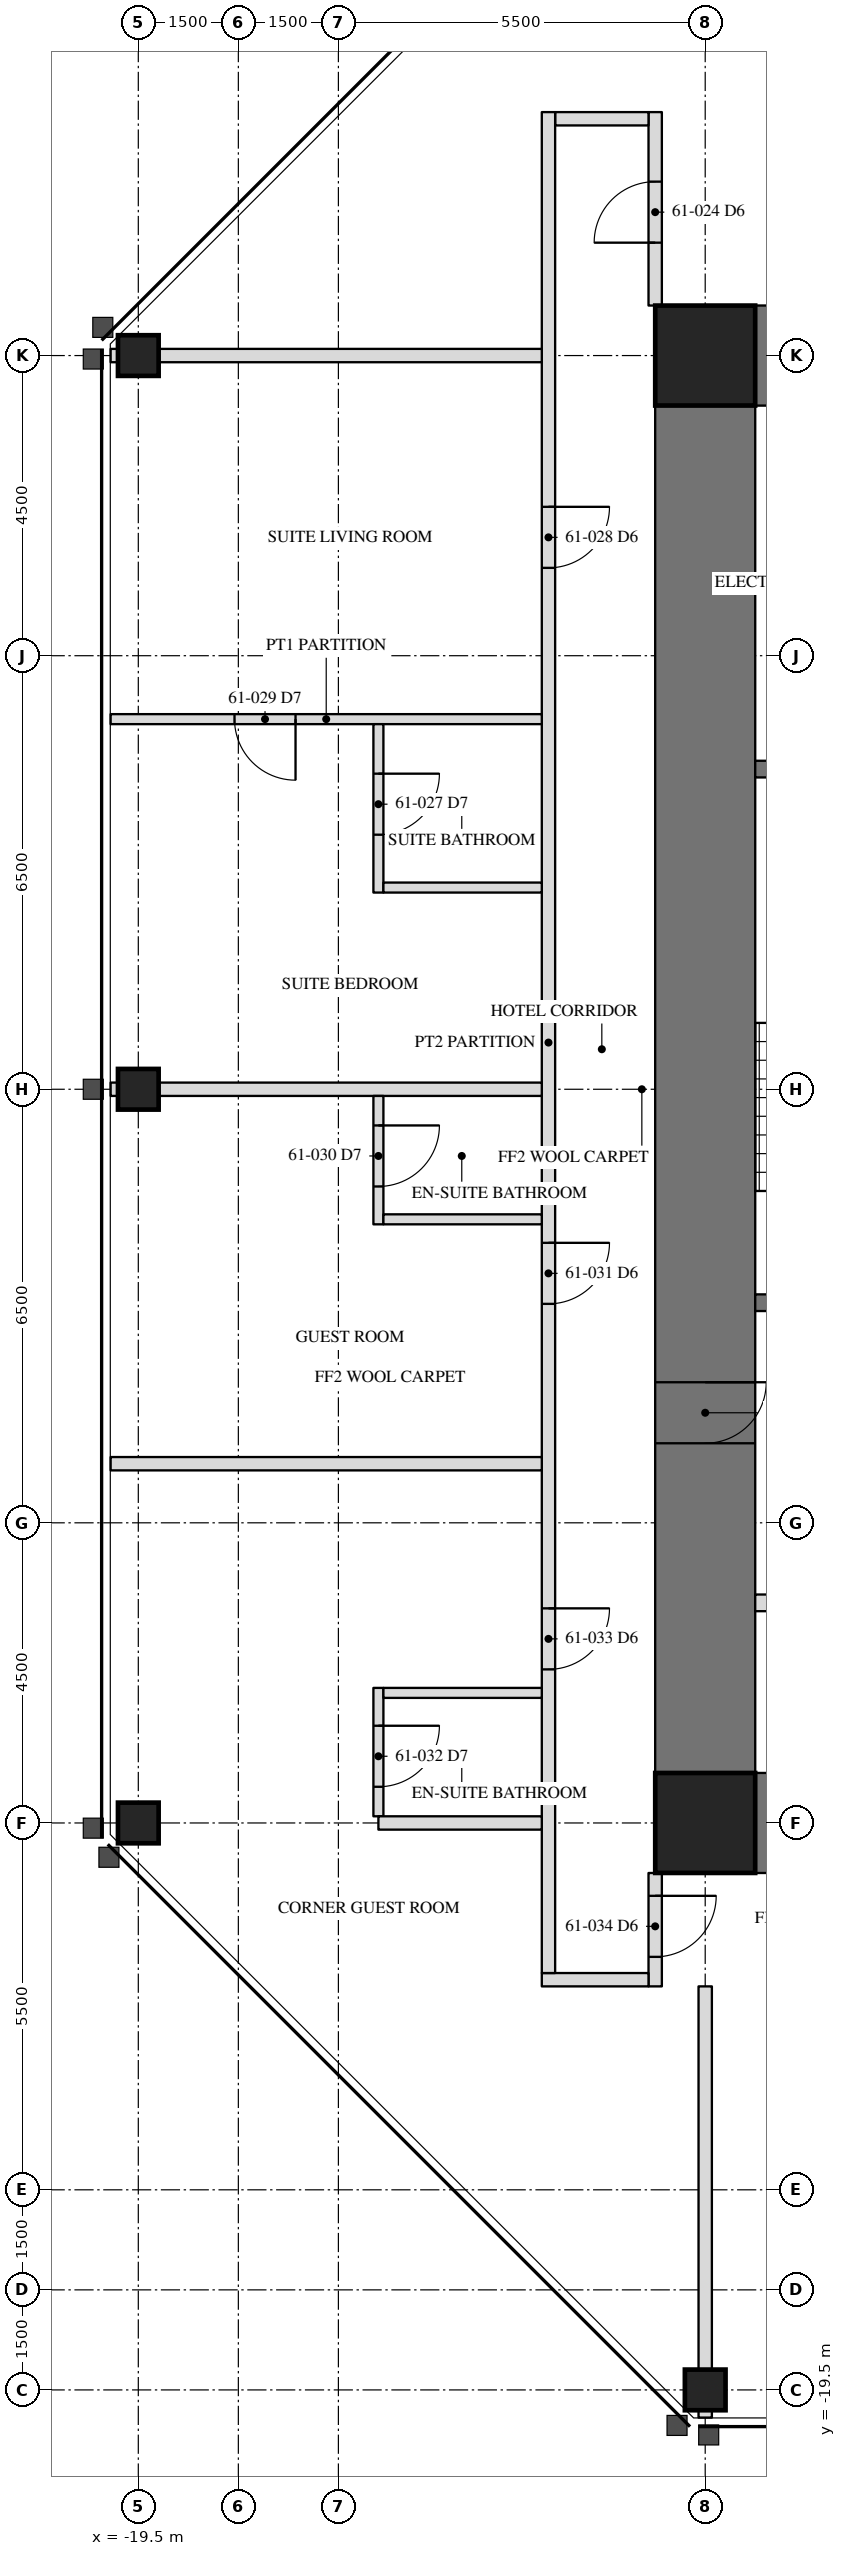
"""IFC4 building model, lengths in metres.
Left out: names, types, materials, properties, quantities, classifications, styles, units other than length and angle.
Written with IfcOpenShell. Run it as: python <this file> out.ifc"""

import sys

from ifc_helpers import new_model, si_unit, direction, frame, frame_2d, origin, origin_2d, place, context, subcontext, project, spatial, rectangle, hollow_rectangle, extrude, element, fill, save


model = new_model("IFC4")
c1 = context("Model", 3, precision=1e-05, world=origin(), true_north=direction((0.0, 1.0)))
c2 = subcontext(c1, "Body", "Model", "MODEL_VIEW")
j1 = project(units=[si_unit("LENGTHUNIT", "METRE"), si_unit("PLANEANGLEUNIT", "RADIAN")], contexts=[c1])
p1 = place(None, origin())
s1 = spatial("IfcSite", under=j1, at=p1, CompositionType="ELEMENT")
p2 = place(p1, origin())
s2 = spatial("IfcBuilding", under=s1, at=p2, CompositionType="ELEMENT")
p3 = place(p2, frame((0.0, 0.0, 250.2)))
s3 = spatial("IfcBuildingStorey", under=s2, at=p3, CompositionType="ELEMENT", Elevation=250.2)
for number, where, z_axis, x_axis in (
    (1, (-19.5, 0.0, 0.0), (0.0, 0.0, 1.0), (0.0, 1.0, 0.0)),
    (2, (-19.5, -11.0, 0.0), (0.0, 0.0, 1.0), (0.0, 1.0, 0.0)),
    (3, (-11.0, -19.5, 0.0), (0.0, 0.0, 1.0), (1.0, 0.0, 0.0)),
    (4, (-19.5, 11.0, 0.0), (0.0, 0.0, 1.0), (0.0, 1.0, 0.0)),
):
    element("IfcColumn", number, at=place(p3, frame(where, z_axis=z_axis, x_axis=x_axis)), inside=s3, PredefinedType="COLUMN", context=c2, shape_type="SweptSolid", body=[
        extrude(hollow_rectangle(XDim=0.61, YDim=0.61, WallThickness=0.051, at=origin_2d()), origin(), (0.0, 0.0, 1.0), 3.5),
    ])
p4 = place(p3, frame((-11.0, 11.0, 0.0), z_axis=(0.0, 0.0, 1.0), x_axis=(0.0, -1.0, 0.0)))
e5 = element("IfcWall", 5, at=p4, inside=s3, PredefinedType="SHEAR", context=c2, shape_type="SweptSolid", body=[
    extrude(rectangle(XDim=22.0, YDim=1.5, at=frame_2d((11.0, 0.0))), origin(), (0.0, 0.0, 1.0), 3.5),
])
p5 = place(p4, frame((15.393, 0.0, 0.0)))
e6 = element("IfcOpeningElement", 6, at=p5, cuts=e5, PredefinedType="OPENING", context=c2, shape_type="SweptSolid", body=[
    extrude(rectangle(XDim=0.915, YDim=2.134, at=frame_2d((0.458, 1.067))), frame((0.0, 0.76, 0.0), z_axis=(0.0, -1.0, 0.0), x_axis=(1.0, 0.0, 0.0)), (0.0, 0.0, 1.0), 1.52),
])
for number, where, z_axis, x_axis in (
    (7, (-6.5, 11.0, 0.0), (0.0, 0.0, 1.0), (-1.0, 0.0, 0.0)),
    (8, (-11.0, -11.0, 0.0), (0.0, 0.0, 1.0), (1.0, 0.0, 0.0)),
):
    element("IfcWall", number, at=place(p3, frame(where, z_axis=z_axis, x_axis=x_axis)), inside=s3, PredefinedType="SHEAR", context=c2, shape_type="SweptSolid", body=[
        extrude(rectangle(XDim=4.5, YDim=1.5, at=frame_2d((2.25, 0.0))), origin(), (0.0, 0.0, 1.0), 3.5),
    ])
for number, where, z_axis, x_axis in (
    (9, (-11.0, 11.0, 0.0), (0.0, 0.0, 1.0), (1.0, 0.0, 0.0)),
    (10, (-11.0, -11.0, 0.0), (0.0, 0.0, 1.0), (1.0, 0.0, 0.0)),
):
    element("IfcColumn", number, at=place(p3, frame(where, z_axis=z_axis, x_axis=x_axis)), inside=s3, PredefinedType="COLUMN", context=c2, shape_type="SweptSolid", body=[
        extrude(hollow_rectangle(XDim=1.499, YDim=1.499, WallThickness=0.102, at=origin_2d()), origin(), (0.0, 0.0, 1.0), 3.5),
    ])
p6 = place(p3, frame((-6.95, 4.8, 0.0), z_axis=(0.0, 0.0, 1.0), x_axis=(-1.0, 0.0, 0.0)))
e11 = element("IfcWall", 11, at=p6, inside=s3, PredefinedType="SOLIDWALL", context=c2, shape_type="SweptSolid", body=[
    extrude(rectangle(XDim=3.3, YDim=0.25, at=frame_2d((1.65, 0.0))), origin(), (0.0, 0.0, 1.0), 3.31),
])
p7 = place(p3, frame((-6.95, -3.2, 0.0), z_axis=(0.0, 0.0, 1.0), x_axis=(-1.0, 0.0, 0.0)))
e12 = element("IfcWall", 12, at=p7, inside=s3, PredefinedType="SOLIDWALL", context=c2, shape_type="SweptSolid", body=[
    extrude(rectangle(XDim=3.3, YDim=0.25, at=frame_2d((1.65, 0.0))), origin(), (0.0, 0.0, 1.0), 3.31),
])
p8 = place(p7, frame((1.116, 0.0, 0.0)))
e13 = element("IfcOpeningElement", 13, at=p8, cuts=e12, PredefinedType="OPENING", context=c2, shape_type="SweptSolid", body=[
    extrude(rectangle(XDim=1.067, YDim=2.134, at=frame_2d((0.533, 1.067))), frame((0.0, 0.135, 0.0), z_axis=(0.0, -1.0, 0.0), x_axis=(1.0, 0.0, 0.0)), (0.0, 0.0, 1.0), 0.27),
])
p9 = place(p3, frame((-6.95, -7.7, 0.0), z_axis=(0.0, 0.0, 1.0), x_axis=(-1.0, 0.0, 0.0)))
e14 = element("IfcWall", 14, at=p9, inside=s3, PredefinedType="PARTITIONING", context=c2, shape_type="SweptSolid", body=[
    extrude(rectangle(XDim=3.3, YDim=0.25, at=frame_2d((1.65, 0.0))), origin(), (0.0, 0.0, 1.0), 3.31),
])
p10 = place(p9, frame((0.45, 0.0, 0.0)))
e15 = element("IfcOpeningElement", 15, at=p10, cuts=e14, PredefinedType="OPENING", context=c2, shape_type="SweptSolid", body=[
    extrude(rectangle(XDim=1.219, YDim=2.134, at=frame_2d((0.609, 1.067))), frame((0.0, 0.135, 0.0), z_axis=(0.0, -1.0, 0.0), x_axis=(1.0, 0.0, 0.0)), (0.0, 0.0, 1.0), 0.27),
])
p11 = place(p3, frame((-11.75, 11.75, 0.0), z_axis=(0.0, 0.0, 1.0), x_axis=(0.0, 1.0, 0.0)))
e16 = element("IfcWall", 16, at=p11, inside=s3, PredefinedType="PARTITIONING", context=c2, shape_type="SweptSolid", body=[
    extrude(rectangle(XDim=2.9, YDim=0.2, at=frame_2d((1.45, 0.0))), origin(), (0.0, 0.0, 1.0), 3.31),
])
p12 = place(p11, frame((0.942, 0.0, 0.0)))
e17 = element("IfcOpeningElement", 17, at=p12, cuts=e16, PredefinedType="OPENING", context=c2, shape_type="SweptSolid", body=[
    extrude(rectangle(XDim=0.915, YDim=2.134, at=frame_2d((0.458, 1.067))), frame((0.0, 0.11, 0.0), z_axis=(0.0, -1.0, 0.0), x_axis=(1.0, 0.0, 0.0)), (0.0, 0.0, 1.0), 0.22),
])
p13 = place(p3, frame((-11.85, 14.55, 0.0), z_axis=(0.0, 0.0, 1.0), x_axis=(-1.0, 0.0, 0.0)))
e18 = element("IfcWall", 18, at=p13, inside=s3, PredefinedType="PARTITIONING", context=c2, shape_type="SweptSolid", body=[
    extrude(rectangle(XDim=1.4, YDim=0.2, at=frame_2d((0.7, 0.0))), origin(), (0.0, 0.0, 1.0), 3.31),
])
p14 = place(p3, frame((-11.75, -11.75, 0.0), z_axis=(0.0, 0.0, 1.0), x_axis=(0.0, -1.0, 0.0)))
e19 = element("IfcWall", 19, at=p14, inside=s3, PredefinedType="PARTITIONING", context=c2, shape_type="SweptSolid", body=[
    extrude(rectangle(XDim=1.7, YDim=0.2, at=frame_2d((0.85, 0.0))), origin(), (0.0, 0.0, 1.0), 3.31),
])
p15 = place(p14, frame((0.343, 0.0, 0.0)))
e20 = element("IfcOpeningElement", 20, at=p15, cuts=e19, PredefinedType="OPENING", context=c2, shape_type="SweptSolid", body=[
    extrude(rectangle(XDim=0.915, YDim=2.134, at=frame_2d((0.458, 1.067))), frame((0.0, 0.11, 0.0), z_axis=(0.0, -1.0, 0.0), x_axis=(1.0, 0.0, 0.0)), (0.0, 0.0, 1.0), 0.22),
])
p16 = place(p3, frame((-13.45, -13.35, 0.0), z_axis=(0.0, 0.0, 1.0), x_axis=(1.0, 0.0, 0.0)))
e21 = element("IfcWall", 21, at=p16, inside=s3, PredefinedType="PARTITIONING", context=c2, shape_type="SweptSolid", body=[
    extrude(rectangle(XDim=1.6, YDim=0.2, at=frame_2d((0.8, 0.0))), origin(), (0.0, 0.0, 1.0), 3.31),
])
p17 = place(p3, frame((-13.35, 14.65, 0.0), z_axis=(0.0, 0.0, 1.0), x_axis=(0.0, -1.0, 0.0)))
e22 = element("IfcWall", 22, at=p17, inside=s3, PredefinedType="PARTITIONING", context=c2, shape_type="SweptSolid", body=[
    extrude(rectangle(XDim=27.9, YDim=0.2, at=frame_2d((13.95, 0.0))), origin(), (0.0, 0.0, 1.0), 3.31),
])
p18 = place(p17, frame((5.918, 0.0, 0.0)))
e23 = element("IfcOpeningElement", 23, at=p18, cuts=e22, PredefinedType="OPENING", context=c2, shape_type="SweptSolid", body=[
    extrude(rectangle(XDim=0.915, YDim=2.134, at=frame_2d((0.458, 1.067))), frame((0.0, 0.11, 0.0), z_axis=(0.0, -1.0, 0.0), x_axis=(1.0, 0.0, 0.0)), (0.0, 0.0, 1.0), 0.22),
])
p19 = place(p17, frame((16.952, 0.0, 0.0)))
e24 = element("IfcOpeningElement", 24, at=p19, cuts=e22, PredefinedType="OPENING", context=c2, shape_type="SweptSolid", body=[
    extrude(rectangle(XDim=0.915, YDim=2.134, at=frame_2d((0.458, 1.067))), frame((0.0, 0.11, 0.0), z_axis=(0.0, -1.0, 0.0), x_axis=(1.0, 0.0, 0.0)), (0.0, 0.0, 1.0), 0.22),
])
p20 = place(p17, frame((22.433, 0.0, 0.0)))
e25 = element("IfcOpeningElement", 25, at=p20, cuts=e22, PredefinedType="OPENING", context=c2, shape_type="SweptSolid", body=[
    extrude(rectangle(XDim=0.915, YDim=2.134, at=frame_2d((0.458, 1.067))), frame((0.0, 0.11, 0.0), z_axis=(0.0, -1.0, 0.0), x_axis=(1.0, 0.0, 0.0)), (0.0, 0.0, 1.0), 0.22),
])
for number, where, z_axis, x_axis in (
    (26, (-13.45, 11.0, 0.0), (0.0, 0.0, 1.0), (-1.0, 0.0, 0.0)),
    (27, (-13.45, 0.0, 0.0), (0.0, 0.0, 1.0), (-1.0, 0.0, 0.0)),
):
    element("IfcWall", number, at=place(p3, frame(where, z_axis=z_axis, x_axis=x_axis)), inside=s3, PredefinedType="PARTITIONING", context=c2, shape_type="SweptSolid", body=[
        extrude(rectangle(XDim=6.465, YDim=0.2, at=frame_2d((3.232, 0.0))), origin(), (0.0, 0.0, 1.0), 2.802),
    ])
p21 = place(p3, frame((-13.45, -5.614, 0.0), z_axis=(0.0, 0.0, 1.0), x_axis=(-1.0, 0.0, 0.0)))
e28 = element("IfcWall", 28, at=p21, inside=s3, PredefinedType="PARTITIONING", context=c2, shape_type="SweptSolid", body=[
    extrude(rectangle(XDim=6.465, YDim=0.2, at=frame_2d((3.232, 0.0))), origin(), (0.0, 0.0, 1.0), 3.31),
])
p22 = place(p3, frame((-13.45, 5.549, 0.0), z_axis=(0.0, 0.0, 1.0), x_axis=(-1.0, 0.0, 0.0)))
e29 = element("IfcWall", 29, at=p22, inside=s3, PredefinedType="PARTITIONING", context=c2, shape_type="SweptSolid", body=[
    extrude(rectangle(XDim=6.465, YDim=0.15, at=frame_2d((3.232, 0.0))), origin(), (0.0, 0.0, 1.0), 3.31),
])
p23 = place(p22, frame((3.692, 0.0, 0.0)))
e30 = element("IfcOpeningElement", 30, at=p23, cuts=e29, PredefinedType="OPENING", context=c2, shape_type="SweptSolid", body=[
    extrude(rectangle(XDim=0.915, YDim=2.032, at=frame_2d((0.458, 1.016))), frame((0.0, 0.085, 0.0), z_axis=(0.0, -1.0, 0.0), x_axis=(1.0, 0.0, 0.0)), (0.0, 0.0, 1.0), 0.17),
])
p24 = place(p3, frame((-15.9, 5.474, 0.0), z_axis=(0.0, 0.0, 1.0), x_axis=(0.0, -1.0, 0.0)))
e31 = element("IfcWall", 31, at=p24, inside=s3, PredefinedType="PARTITIONING", context=c2, shape_type="SweptSolid", body=[
    extrude(rectangle(XDim=2.525, YDim=0.15, at=frame_2d((1.263, 0.0))), origin(), (0.0, 0.0, 1.0), 3.31),
])
p25 = place(p24, frame((0.742, 0.0, 0.0)))
e32 = element("IfcOpeningElement", 32, at=p25, cuts=e31, PredefinedType="OPENING", context=c2, shape_type="SweptSolid", body=[
    extrude(rectangle(XDim=0.915, YDim=2.032, at=frame_2d((0.458, 1.016))), frame((0.0, 0.085, 0.0), z_axis=(0.0, -1.0, 0.0), x_axis=(1.0, 0.0, 0.0)), (0.0, 0.0, 1.0), 0.17),
])
p26 = place(p3, frame((-13.45, 3.024, 0.0), z_axis=(0.0, 0.0, 1.0), x_axis=(-1.0, 0.0, 0.0)))
e33 = element("IfcWall", 33, at=p26, inside=s3, PredefinedType="PARTITIONING", context=c2, shape_type="SweptSolid", body=[
    extrude(rectangle(XDim=2.375, YDim=0.15, at=frame_2d((1.188, 0.0))), origin(), (0.0, 0.0, 1.0), 3.31),
])
p27 = place(p3, frame((-15.9, -0.1, 0.0), z_axis=(0.0, 0.0, 1.0), x_axis=(0.0, -1.0, 0.0)))
e34 = element("IfcWall", 34, at=p27, inside=s3, PredefinedType="PARTITIONING", context=c2, shape_type="SweptSolid", body=[
    extrude(rectangle(XDim=1.925, YDim=0.15, at=frame_2d((0.962, 0.0))), origin(), (0.0, 0.0, 1.0), 3.31),
])
p28 = place(p27, frame((0.442, 0.0, 0.0)))
e35 = element("IfcOpeningElement", 35, at=p28, cuts=e34, PredefinedType="OPENING", context=c2, shape_type="SweptSolid", body=[
    extrude(rectangle(XDim=0.915, YDim=2.032, at=frame_2d((0.458, 1.016))), frame((0.0, 0.085, 0.0), z_axis=(0.0, -1.0, 0.0), x_axis=(1.0, 0.0, 0.0)), (0.0, 0.0, 1.0), 0.17),
])
p29 = place(p3, frame((-13.45, -1.95, 0.0), z_axis=(0.0, 0.0, 1.0), x_axis=(-1.0, 0.0, 0.0)))
e36 = element("IfcWall", 36, at=p29, inside=s3, PredefinedType="PARTITIONING", context=c2, shape_type="SweptSolid", body=[
    extrude(rectangle(XDim=2.375, YDim=0.15, at=frame_2d((1.188, 0.0))), origin(), (0.0, 0.0, 1.0), 3.31),
])
p30 = place(p3, frame((-15.9, -8.975, 0.0), z_axis=(0.0, 0.0, 1.0), x_axis=(0.0, -1.0, 0.0)))
e37 = element("IfcWall", 37, at=p30, inside=s3, PredefinedType="PARTITIONING", context=c2, shape_type="SweptSolid", body=[
    extrude(rectangle(XDim=1.925, YDim=0.15, at=frame_2d((0.962, 0.0))), origin(), (0.0, 0.0, 1.0), 3.31),
])
p31 = place(p30, frame((0.567, 0.0, 0.0)))
e38 = element("IfcOpeningElement", 38, at=p31, cuts=e37, PredefinedType="OPENING", context=c2, shape_type="SweptSolid", body=[
    extrude(rectangle(XDim=0.915, YDim=2.032, at=frame_2d((0.458, 1.016))), frame((0.0, 0.085, 0.0), z_axis=(0.0, -1.0, 0.0), x_axis=(1.0, 0.0, 0.0)), (0.0, 0.0, 1.0), 0.17),
])
p32 = place(p3, frame((-13.45, -9.05, 0.0), z_axis=(0.0, 0.0, 1.0), x_axis=(-1.0, 0.0, 0.0)))
e39 = element("IfcWall", 39, at=p32, inside=s3, PredefinedType="PARTITIONING", context=c2, shape_type="SweptSolid", body=[
    extrude(rectangle(XDim=2.375, YDim=0.15, at=frame_2d((1.188, 0.0))), origin(), (0.0, 0.0, 1.0), 3.31),
])
p33 = place(p3, frame((-13.45, -11.0, 0.0), z_axis=(0.0, 0.0, 1.0), x_axis=(-1.0, 0.0, 0.0)))
e40 = element("IfcWall", 40, at=p33, inside=s3, PredefinedType="PARTITIONING", context=c2, shape_type="SweptSolid", body=[
    extrude(rectangle(XDim=2.45, YDim=0.2, at=frame_2d((1.225, 0.0))), origin(), (0.0, 0.0, 1.0), 2.802),
])
p34 = place(p3, frame((-11.0, -13.45, 0.0), z_axis=(0.0, 0.0, 1.0), x_axis=(0.0, -1.0, 0.0)))
e41 = element("IfcWall", 41, at=p34, inside=s3, PredefinedType="PARTITIONING", context=c2, shape_type="SweptSolid", body=[
    extrude(rectangle(XDim=6.465, YDim=0.2, at=frame_2d((3.232, 0.0))), origin(), (0.0, 0.0, 1.0), 2.802),
])
p35 = place(p5, origin())
e42 = element("IfcDoor", 42, at=p35, inside=s3, OperationType="SINGLE_SWING_RIGHT", PredefinedType="DOOR", context=c2, shape_type="SweptSolid", body=[
    extrude(rectangle(XDim=0.915, YDim=2.134, at=frame_2d((0.458, 1.067))), frame((0.0, -0.675, 0.0), z_axis=(0.0, -1.0, 0.0), x_axis=(1.0, 0.0, 0.0)), (0.0, 0.0, 1.0), 0.05),
])
fill(e6, e42)
p36 = place(p12, origin())
e43 = element("IfcDoor", 43, at=p36, inside=s3, OperationType="SINGLE_SWING_LEFT", PredefinedType="DOOR", context=c2, shape_type="SweptSolid", body=[
    extrude(rectangle(XDim=0.915, YDim=2.134, at=frame_2d((0.458, 1.067))), frame((0.0, 0.025, 0.0), z_axis=(0.0, -1.0, 0.0), x_axis=(1.0, 0.0, 0.0)), (0.0, 0.0, 1.0), 0.05),
])
fill(e17, e43)
p37 = place(p25, origin())
e44 = element("IfcDoor", 44, at=p37, inside=s3, OperationType="SINGLE_SWING_LEFT", PredefinedType="DOOR", context=c2, shape_type="SweptSolid", body=[
    extrude(rectangle(XDim=0.915, YDim=2.032, at=frame_2d((0.458, 1.016))), frame((0.0, 0.025, 0.0), z_axis=(0.0, -1.0, 0.0), x_axis=(1.0, 0.0, 0.0)), (0.0, 0.0, 1.0), 0.05),
])
fill(e32, e44)
p38 = place(p18, origin())
e45 = element("IfcDoor", 45, at=p38, inside=s3, OperationType="SINGLE_SWING_LEFT", PredefinedType="DOOR", context=c2, shape_type="SweptSolid", body=[
    extrude(rectangle(XDim=0.915, YDim=2.134, at=frame_2d((0.458, 1.067))), frame((0.0, 0.025, 0.0), z_axis=(0.0, -1.0, 0.0), x_axis=(1.0, 0.0, 0.0)), (0.0, 0.0, 1.0), 0.05),
])
fill(e23, e45)
p39 = place(p23, origin())
e46 = element("IfcDoor", 46, at=p39, inside=s3, OperationType="SINGLE_SWING_LEFT", PredefinedType="DOOR", context=c2, shape_type="SweptSolid", body=[
    extrude(rectangle(XDim=0.915, YDim=2.032, at=frame_2d((0.458, 1.016))), frame((0.0, 0.025, 0.0), z_axis=(0.0, -1.0, 0.0), x_axis=(1.0, 0.0, 0.0)), (0.0, 0.0, 1.0), 0.05),
])
fill(e30, e46)
p40 = place(p28, origin())
e47 = element("IfcDoor", 47, at=p40, inside=s3, OperationType="SINGLE_SWING_LEFT", PredefinedType="DOOR", context=c2, shape_type="SweptSolid", body=[
    extrude(rectangle(XDim=0.915, YDim=2.032, at=frame_2d((0.458, 1.016))), frame((0.0, 0.025, 0.0), z_axis=(0.0, -1.0, 0.0), x_axis=(1.0, 0.0, 0.0)), (0.0, 0.0, 1.0), 0.05),
])
fill(e35, e47)
p41 = place(p19, origin())
e48 = element("IfcDoor", 48, at=p41, inside=s3, OperationType="SINGLE_SWING_LEFT", PredefinedType="DOOR", context=c2, shape_type="SweptSolid", body=[
    extrude(rectangle(XDim=0.915, YDim=2.134, at=frame_2d((0.458, 1.067))), frame((0.0, 0.025, 0.0), z_axis=(0.0, -1.0, 0.0), x_axis=(1.0, 0.0, 0.0)), (0.0, 0.0, 1.0), 0.05),
])
fill(e24, e48)
p42 = place(p31, origin())
e49 = element("IfcDoor", 49, at=p42, inside=s3, OperationType="SINGLE_SWING_LEFT", PredefinedType="DOOR", context=c2, shape_type="SweptSolid", body=[
    extrude(rectangle(XDim=0.915, YDim=2.032, at=frame_2d((0.458, 1.016))), frame((0.0, 0.025, 0.0), z_axis=(0.0, -1.0, 0.0), x_axis=(1.0, 0.0, 0.0)), (0.0, 0.0, 1.0), 0.05),
])
fill(e38, e49)
p43 = place(p20, origin())
e50 = element("IfcDoor", 50, at=p43, inside=s3, OperationType="SINGLE_SWING_LEFT", PredefinedType="DOOR", context=c2, shape_type="SweptSolid", body=[
    extrude(rectangle(XDim=0.915, YDim=2.134, at=frame_2d((0.458, 1.067))), frame((0.0, 0.025, 0.0), z_axis=(0.0, -1.0, 0.0), x_axis=(1.0, 0.0, 0.0)), (0.0, 0.0, 1.0), 0.05),
])
fill(e25, e50)
p44 = place(p15, origin())
e51 = element("IfcDoor", 51, at=p44, inside=s3, OperationType="SINGLE_SWING_LEFT", PredefinedType="DOOR", context=c2, shape_type="SweptSolid", body=[
    extrude(rectangle(XDim=0.915, YDim=2.134, at=frame_2d((0.458, 1.067))), frame((0.0, 0.025, 0.0), z_axis=(0.0, -1.0, 0.0), x_axis=(1.0, 0.0, 0.0)), (0.0, 0.0, 1.0), 0.05),
])
fill(e20, e51)
save(model, sys.argv[1])
